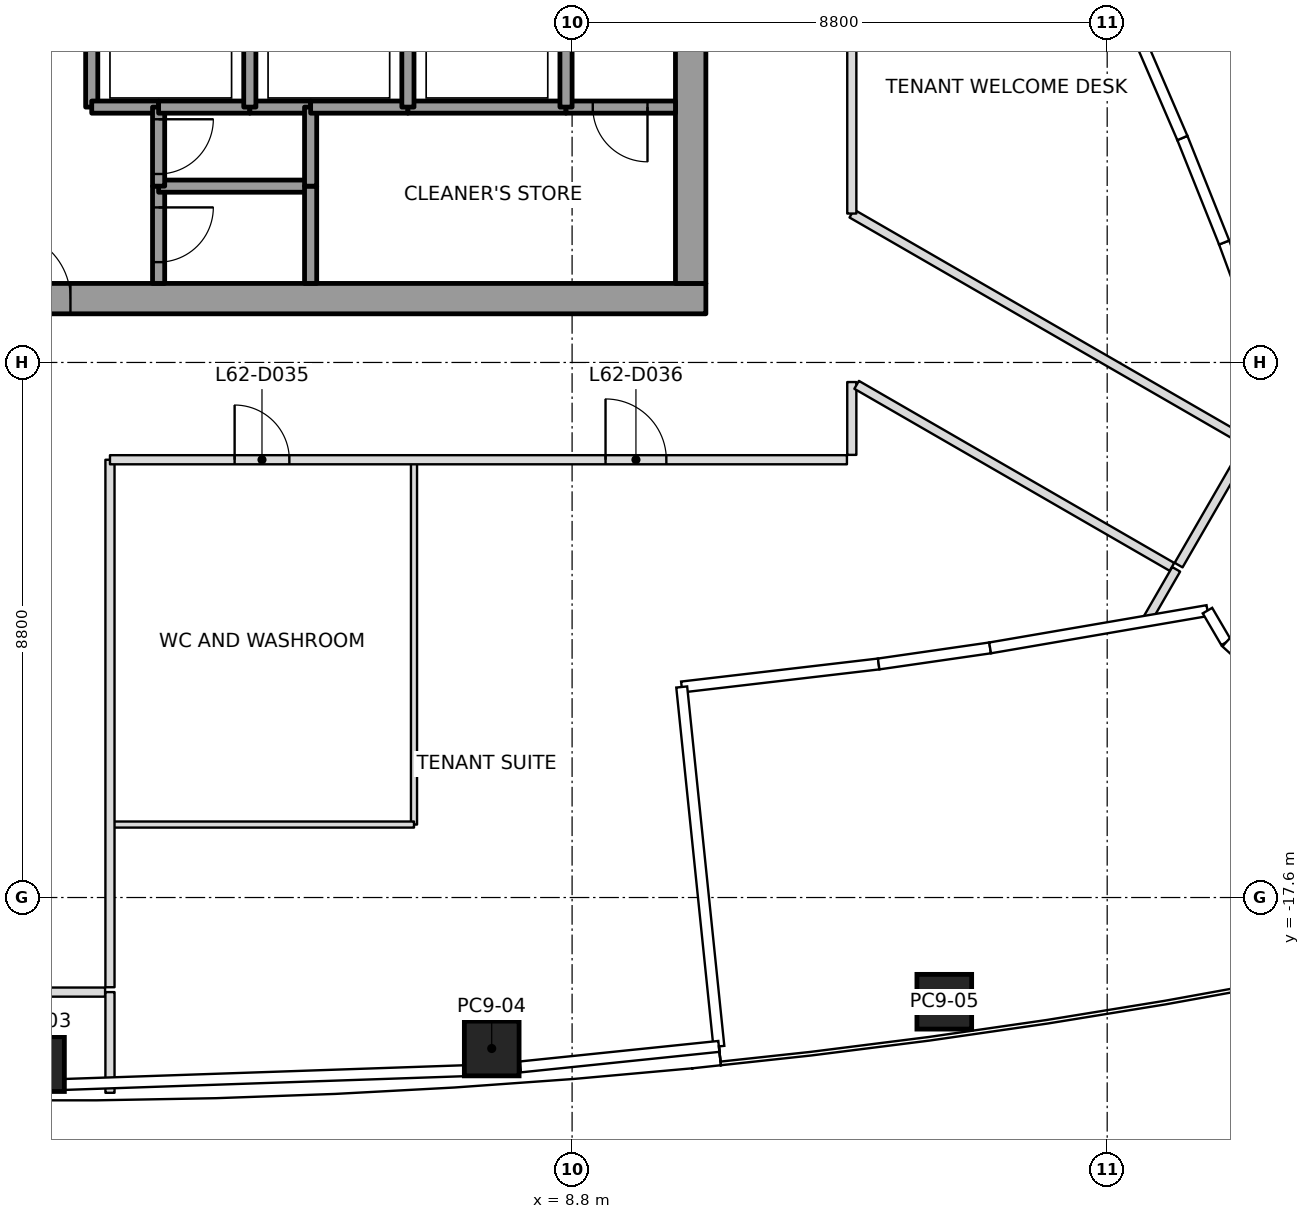
"""IFC4 building model, lengths in metres.
Left out: names, types, materials, properties, quantities, classifications, styles, units other than length and angle.
Written with IfcOpenShell. Run it as: python <this file> out.ifc"""

import sys

from ifc_helpers import new_model, si_unit, direction, frame, frame_2d, origin, origin_2d, place, context, subcontext, project, spatial, rectangle, extrude, element, fill, save


model = new_model("IFC4")
c1 = context("Model", 3, precision=1e-05, world=origin(), true_north=direction((0.0, 1.0)))
c2 = subcontext(c1, "Body", "Model", "MODEL_VIEW")
j1 = project(units=[si_unit("LENGTHUNIT", "METRE"), si_unit("PLANEANGLEUNIT", "RADIAN")], contexts=[c1])
p1 = place(None, origin())
s1 = spatial("IfcSite", under=j1, at=p1, CompositionType="ELEMENT")
p2 = place(p1, origin())
s2 = spatial("IfcBuilding", under=s1, at=p2, CompositionType="ELEMENT")
p3 = place(p2, frame((0.0, 0.0, 275.0)))
s3 = spatial("IfcBuildingStorey", under=s2, at=p3, CompositionType="ELEMENT", Elevation=275.0)
p4 = place(p3, frame((0.0, -20.34, 0.0), z_axis=(0.0, 0.011473854038, 0.99993417317), x_axis=(1.0, 0.0, 0.0)))
e1 = element("IfcColumn", 1, at=p4, inside=s3, PredefinedType="COLUMN", context=c2, shape_type="SweptSolid", body=[
    extrude(rectangle(XDim=0.9, YDim=0.9, at=origin_2d()), origin(), (0.0, 0.0, 1.0), 4.0),
])
p5 = place(p3, frame((7.478, -20.083, 0.0), z_axis=(-0.008788174922, 0.01116830563, 0.999899013366), x_axis=(0.997605695254, 0.068693994382, 0.008000745797)))
e2 = element("IfcColumn", 2, at=p5, inside=s3, PredefinedType="COLUMN", context=c2, shape_type="SweptSolid", body=[
    extrude(rectangle(XDim=0.9, YDim=0.9, at=origin_2d()), origin(), (0.0, 0.0, 1.0), 4.0),
])
p6 = place(p3, frame((14.921, -19.314, 0.0), z_axis=(-0.017452456582, 0.010373837829, 0.999793876381), x_axis=(0.990437350176, 0.137047764471, 0.015867124157)))
e3 = element("IfcColumn", 3, at=p6, inside=s3, PredefinedType="COLUMN", context=c2, shape_type="SweptSolid", body=[
    extrude(rectangle(XDim=0.9, YDim=0.9, at=origin_2d()), origin(), (0.0, 0.0, 1.0), 4.001),
])
p7 = place(p3, frame((-11.0, -7.75, 0.0), z_axis=(0.0, 0.0, 1.0), x_axis=(1.0, 0.0, 0.0)))
e4 = element("IfcWall", 4, at=p7, inside=s3, PredefinedType="SHEAR", context=c2, shape_type="SweptSolid", body=[
    extrude(rectangle(XDim=22.0, YDim=0.5, at=frame_2d((11.0, 0.0))), origin(), (0.0, 0.0, 1.0), 4.0),
])
p8 = place(p7, frame((10.45, 0.0, 0.0)))
e5 = element("IfcOpeningElement", 5, at=p8, cuts=e4, PredefinedType="OPENING", context=c2, shape_type="SweptSolid", body=[
    extrude(rectangle(XDim=1.1, YDim=2.1, at=frame_2d((0.55, 1.05))), frame((0.0, 0.25, 0.0), z_axis=(0.0, -1.0, 0.0), x_axis=(1.0, 0.0, 0.0)), (0.0, 0.0, 1.0), 0.5),
])
p9 = place(p3, frame((10.75, -7.5, 0.0), z_axis=(0.0, 0.0, 1.0), x_axis=(0.0, 1.0, 0.0)))
e6 = element("IfcWall", 6, at=p9, inside=s3, PredefinedType="SHEAR", context=c2, shape_type="SweptSolid", body=[
    extrude(rectangle(XDim=15.0, YDim=0.5, at=frame_2d((7.5, 0.0))), origin(), (0.0, 0.0, 1.0), 4.0),
])
p10 = place(p9, frame((6.6, 0.0, 0.0)))
e7 = element("IfcOpeningElement", 7, at=p10, cuts=e6, PredefinedType="OPENING", context=c2, shape_type="SweptSolid", body=[
    extrude(rectangle(XDim=1.8, YDim=2.1, at=frame_2d((0.9, 1.05))), frame((0.0, 0.25, 0.0), z_axis=(0.0, -1.0, 0.0), x_axis=(1.0, 0.0, 0.0)), (0.0, 0.0, 1.0), 0.5),
])
p11 = place(p3, frame((0.9, -1.8, 0.0), z_axis=(0.0, 0.0, 1.0), x_axis=(0.0, -1.0, 0.0)))
e8 = element("IfcWall", 8, at=p11, inside=s3, PredefinedType="SOLIDWALL", context=c2, shape_type="SweptSolid", body=[
    extrude(rectangle(XDim=2.8, YDim=0.2, at=frame_2d((1.4, 0.0))), origin(), (0.0, 0.0, 1.0), 3.85),
])
p12 = place(p3, frame((0.9, -4.6, 0.0), z_axis=(0.0, 0.0, 1.0), x_axis=(1.0, 0.0, 0.0)))
e9 = element("IfcWall", 9, at=p12, inside=s3, PredefinedType="SOLIDWALL", context=c2, shape_type="SweptSolid", body=[
    extrude(rectangle(XDim=1.1, YDim=0.2, at=frame_2d((0.55, 0.0))), origin(), (0.0, 0.0, 1.0), 3.85),
])
p13 = place(p3, frame((2.0, -5.9, 0.0), z_axis=(0.0, 0.0, 1.0), x_axis=(0.0, -1.0, 0.0)))
e10 = element("IfcWall", 10, at=p13, inside=s3, PredefinedType="SOLIDWALL", context=c2, shape_type="SweptSolid", body=[
    extrude(rectangle(XDim=1.6, YDim=0.2, at=frame_2d((0.8, 0.0))), origin(), (0.0, 0.0, 1.0), 3.85),
])
p14 = place(p13, frame((0.35, 0.0, 0.0)))
e11 = element("IfcOpeningElement", 11, at=p14, cuts=e10, PredefinedType="OPENING", context=c2, shape_type="SweptSolid", body=[
    extrude(rectangle(XDim=0.9, YDim=2.1, at=frame_2d((0.45, 1.05))), frame((0.0, 0.1, 0.0), z_axis=(0.0, -1.0, 0.0), x_axis=(1.0, 0.0, 0.0)), (0.0, 0.0, 1.0), 0.2),
])
p15 = place(p3, frame((4.5, -5.9, 0.0), z_axis=(0.0, 0.0, 1.0), x_axis=(-1.0, 0.0, 0.0)))
e12 = element("IfcWall", 12, at=p15, inside=s3, PredefinedType="SOLIDWALL", context=c2, shape_type="SweptSolid", body=[
    extrude(rectangle(XDim=2.5, YDim=0.2, at=frame_2d((1.25, 0.0))), origin(), (0.0, 0.0, 1.0), 3.85),
])
p16 = place(p3, frame((2.0, -4.6, 0.0), z_axis=(0.0, 0.0, 1.0), x_axis=(0.0, -1.0, 0.0)))
e13 = element("IfcWall", 13, at=p16, inside=s3, PredefinedType="SOLIDWALL", context=c2, shape_type="SweptSolid", body=[
    extrude(rectangle(XDim=1.3, YDim=0.2, at=frame_2d((0.65, 0.0))), origin(), (0.0, 0.0, 1.0), 3.85),
])
p17 = place(p16, frame((0.2, 0.0, 0.0)))
e14 = element("IfcOpeningElement", 14, at=p17, cuts=e13, PredefinedType="OPENING", context=c2, shape_type="SweptSolid", body=[
    extrude(rectangle(XDim=0.9, YDim=2.1, at=frame_2d((0.45, 1.05))), frame((0.0, 0.1, 0.0), z_axis=(0.0, -1.0, 0.0), x_axis=(1.0, 0.0, 0.0)), (0.0, 0.0, 1.0), 0.2),
])
p18 = place(p3, frame((3.5, -4.6, 0.0), z_axis=(0.0, 0.0, 1.0), x_axis=(-1.0, 0.0, 0.0)))
e15 = element("IfcWall", 15, at=p18, inside=s3, PredefinedType="SOLIDWALL", context=c2, shape_type="SweptSolid", body=[
    extrude(rectangle(XDim=1.5, YDim=0.2, at=frame_2d((0.75, 0.0))), origin(), (0.0, 0.0, 1.0), 3.85),
])
p19 = place(p3, frame((4.5, -4.6, 0.0), z_axis=(0.0, 0.0, 1.0), x_axis=(-1.0, 0.0, 0.0)))
e16 = element("IfcWall", 16, at=p19, inside=s3, PredefinedType="SOLIDWALL", context=c2, shape_type="SweptSolid", body=[
    extrude(rectangle(XDim=1.0, YDim=0.2, at=frame_2d((0.5, 0.0))), origin(), (0.0, 0.0, 1.0), 3.85),
])
p20 = place(p3, frame((3.5, -4.6, 0.0), z_axis=(0.0, 0.0, 1.0), x_axis=(0.0, 1.0, 0.0)))
e17 = element("IfcWall", 17, at=p20, inside=s3, PredefinedType="SOLIDWALL", context=c2, shape_type="SweptSolid", body=[
    extrude(rectangle(XDim=2.8, YDim=0.2, at=frame_2d((1.4, 0.0))), origin(), (0.0, 0.0, 1.0), 3.85),
])
p21 = place(p3, frame((4.5, -5.9, 0.0), z_axis=(0.0, 0.0, 1.0), x_axis=(0.0, -1.0, 0.0)))
e18 = element("IfcWall", 18, at=p21, inside=s3, PredefinedType="SOLIDWALL", context=c2, shape_type="SweptSolid", body=[
    extrude(rectangle(XDim=1.6, YDim=0.2, at=frame_2d((0.8, 0.0))), origin(), (0.0, 0.0, 1.0), 3.85),
])
p22 = place(p3, frame((4.5, -4.6, 0.0), z_axis=(0.0, 0.0, 1.0), x_axis=(0.0, -1.0, 0.0)))
e19 = element("IfcWall", 19, at=p22, inside=s3, PredefinedType="SOLIDWALL", context=c2, shape_type="SweptSolid", body=[
    extrude(rectangle(XDim=1.3, YDim=0.2, at=frame_2d((0.65, 0.0))), origin(), (0.0, 0.0, 1.0), 3.85),
])
p23 = place(p3, frame((6.1, -4.6, 0.0), z_axis=(0.0, 0.0, 1.0), x_axis=(-1.0, 0.0, 0.0)))
e20 = element("IfcWall", 20, at=p23, inside=s3, PredefinedType="SOLIDWALL", context=c2, shape_type="SweptSolid", body=[
    extrude(rectangle(XDim=1.6, YDim=0.2, at=frame_2d((0.8, 0.0))), origin(), (0.0, 0.0, 1.0), 3.85),
])
p24 = place(p3, frame((8.7, -4.6, 0.0), z_axis=(0.0, 0.0, 1.0), x_axis=(-1.0, 0.0, 0.0)))
e21 = element("IfcWall", 21, at=p24, inside=s3, PredefinedType="SOLIDWALL", context=c2, shape_type="SweptSolid", body=[
    extrude(rectangle(XDim=2.6, YDim=0.2, at=frame_2d((1.3, 0.0))), origin(), (0.0, 0.0, 1.0), 3.85),
])
p25 = place(p3, frame((6.1, -4.6, 0.0), z_axis=(0.0, 0.0, 1.0), x_axis=(0.0, 1.0, 0.0)))
e22 = element("IfcWall", 22, at=p25, inside=s3, PredefinedType="SOLIDWALL", context=c2, shape_type="SweptSolid", body=[
    extrude(rectangle(XDim=2.8, YDim=0.2, at=frame_2d((1.4, 0.0))), origin(), (0.0, 0.0, 1.0), 3.85),
])
p26 = place(p3, frame((10.5, -4.6, 0.0), z_axis=(0.0, 0.0, 1.0), x_axis=(-1.0, 0.0, 0.0)))
e23 = element("IfcWall", 23, at=p26, inside=s3, PredefinedType="SOLIDWALL", context=c2, shape_type="SweptSolid", body=[
    extrude(rectangle(XDim=1.8, YDim=0.2, at=frame_2d((0.9, 0.0))), origin(), (0.0, 0.0, 1.0), 3.85),
])
p27 = place(p26, frame((0.46, 0.0, 0.0)))
e24 = element("IfcOpeningElement", 24, at=p27, cuts=e23, PredefinedType="OPENING", context=c2, shape_type="SweptSolid", body=[
    extrude(rectangle(XDim=0.9, YDim=2.1, at=frame_2d((0.45, 1.05))), frame((0.0, 0.1, 0.0), z_axis=(0.0, -1.0, 0.0), x_axis=(1.0, 0.0, 0.0)), (0.0, 0.0, 1.0), 0.2),
])
p28 = place(p3, frame((8.7, -1.8, 0.0), z_axis=(0.0, 0.0, 1.0), x_axis=(0.0, -1.0, 0.0)))
e25 = element("IfcWall", 25, at=p28, inside=s3, PredefinedType="SOLIDWALL", context=c2, shape_type="SweptSolid", body=[
    extrude(rectangle(XDim=2.8, YDim=0.2, at=frame_2d((1.4, 0.0))), origin(), (0.0, 0.0, 1.0), 3.85),
])
p29 = place(p3, frame((1.2, -19.156, 0.0), z_axis=(0.0, 0.0, 1.0), x_axis=(0.0, -1.0, 0.0)))
e26 = element("IfcWall", 26, at=p29, inside=s3, PredefinedType="PARTITIONING", context=c2, shape_type="SweptSolid", body=[
    extrude(rectangle(XDim=1.656, YDim=0.15, at=frame_2d((0.828, 0.0))), origin(), (0.0, 0.0, 1.0), 3.234),
])
p30 = place(p3, frame((18.735, -12.202, 0.0), z_axis=(0.0, 0.0, 1.0), x_axis=(-0.500069196213, -0.865985449646, 0.0)))
e27 = element("IfcWall", 27, at=p30, inside=s3, PredefinedType="PARTITIONING", context=c2, shape_type="SweptSolid", body=[
    extrude(rectangle(XDim=0.995, YDim=0.15, at=frame_2d((0.498, 0.0))), origin(), (0.0, 0.0, 1.0), 3.45),
])
p31 = place(p3, frame((-1.12, -19.156, 0.0), z_axis=(0.0, 0.0, 1.0), x_axis=(1.0, 0.0, 0.0)))
e28 = element("IfcWall", 28, at=p31, inside=s3, PredefinedType="PARTITIONING", context=c2, shape_type="SweptSolid", body=[
    extrude(rectangle(XDim=2.24, YDim=0.15, at=frame_2d((1.12, 0.0))), origin(), (0.0, 0.0, 1.0), 3.45),
])
p32 = place(p3, frame((1.2, -19.076, 0.0), z_axis=(0.0, 0.0, 1.0), x_axis=(0.0, 1.0, 0.0)))
e29 = element("IfcWall", 29, at=p32, inside=s3, PredefinedType="PARTITIONING", context=c2, shape_type="SweptSolid", body=[
    extrude(rectangle(XDim=8.676, YDim=0.15, at=frame_2d((4.338, 0.0))), origin(), (0.0, 0.0, 1.0), 3.45),
])
p33 = place(p3, frame((1.2, -10.4, 0.0), z_axis=(0.0, 0.0, 1.0), x_axis=(1.0, 0.0, 0.0)))
e30 = element("IfcWall", 30, at=p33, inside=s3, PredefinedType="PARTITIONING", context=c2, shape_type="SweptSolid", body=[
    extrude(rectangle(XDim=12.12, YDim=0.15, at=frame_2d((6.06, 0.0))), origin(), (0.0, 0.0, 1.0), 3.317),
])
p34 = place(p33, frame((2.05, 0.0, 0.0)))
e31 = element("IfcOpeningElement", 31, at=p34, cuts=e30, PredefinedType="OPENING", context=c2, shape_type="SweptSolid", body=[
    extrude(rectangle(XDim=0.9, YDim=2.1, at=frame_2d((0.45, 1.05))), frame((0.0, 0.075, 0.0), z_axis=(0.0, -1.0, 0.0), x_axis=(1.0, 0.0, 0.0)), (0.0, 0.0, 1.0), 0.15),
])
p35 = place(p33, frame((8.15, 0.0, 0.0)))
e32 = element("IfcOpeningElement", 32, at=p35, cuts=e30, PredefinedType="OPENING", context=c2, shape_type="SweptSolid", body=[
    extrude(rectangle(XDim=1.0, YDim=2.1, at=frame_2d((0.5, 1.05))), frame((0.0, 0.075, 0.0), z_axis=(0.0, -1.0, 0.0), x_axis=(1.0, 0.0, 0.0)), (0.0, 0.0, 1.0), 0.15),
])
p36 = place(p3, frame((13.4, -10.32, 0.0), z_axis=(0.0, 0.0, 1.0), x_axis=(0.0, 1.0, 0.0)))
e33 = element("IfcWall", 33, at=p36, inside=s3, PredefinedType="PARTITIONING", context=c2, shape_type="SweptSolid", body=[
    extrude(rectangle(XDim=1.198, YDim=0.15, at=frame_2d((0.599, 0.0))), origin(), (0.0, 0.0, 1.0), 3.233),
])
p37 = place(p3, frame((13.479, -9.168, 0.0), z_axis=(0.0, 0.0, 1.0), x_axis=(0.866026717539, -0.499997724503, 0.0)))
e34 = element("IfcWall", 34, at=p37, inside=s3, PredefinedType="PARTITIONING", context=c2, shape_type="SweptSolid", body=[
    extrude(rectangle(XDim=5.988, YDim=0.15, at=frame_2d((2.994, 0.0))), origin(), (0.0, 0.0, 1.0), 3.233),
])
p38 = place(p3, frame((19.865, -10.083, 0.0), z_axis=(0.0, 0.0, 1.0), x_axis=(-0.86603092396, 0.499990438654, 0.0)))
e35 = element("IfcWall", 35, at=p38, inside=s3, PredefinedType="PARTITIONING", context=c2, shape_type="SweptSolid", body=[
    extrude(rectangle(XDim=7.466, YDim=0.15, at=frame_2d((3.733, 0.0))), origin(), (0.0, 0.0, 1.0), 3.317),
])
p39 = place(p3, frame((13.4, -6.351, 0.0), z_axis=(0.0, 0.0, 1.0), x_axis=(0.0, 1.0, 0.0)))
e36 = element("IfcWall", 36, at=p39, inside=s3, PredefinedType="PARTITIONING", context=c2, shape_type="SweptSolid", body=[
    extrude(rectangle(XDim=12.496, YDim=0.15, at=frame_2d((6.248, 0.0))), origin(), (0.0, 0.0, 1.0), 3.317),
])
p40 = place(p39, frame((5.748, 0.0, 0.0)))
e37 = element("IfcOpeningElement", 37, at=p40, cuts=e36, PredefinedType="OPENING", context=c2, shape_type="SweptSolid", body=[
    extrude(rectangle(XDim=1.0, YDim=2.1, at=frame_2d((0.5, 1.05))), frame((0.0, 0.075, 0.0), z_axis=(0.0, -1.0, 0.0), x_axis=(1.0, 0.0, 0.0)), (0.0, 0.0, 1.0), 0.15),
])
p41 = place(p3, frame((18.775, -12.133, 0.0), z_axis=(0.0, 0.0, 1.0), x_axis=(0.49994888933, 0.866054910533, 0.0)))
e38 = element("IfcWall", 38, at=p41, inside=s3, PredefinedType="PARTITIONING", context=c2, shape_type="SweptSolid", body=[
    extrude(rectangle(XDim=2.24, YDim=0.15, at=frame_2d((1.12, 0.0))), origin(), (0.0, 0.0, 1.0), 3.233),
])
p42 = place(p3, frame((6.2, -10.43, 0.0), z_axis=(0.0, 0.0, 1.0), x_axis=(0.0, -1.0, 0.0)))
e39 = element("IfcWall", 39, at=p42, inside=s3, PredefinedType="PARTITIONING", context=c2, shape_type="SweptSolid", body=[
    extrude(rectangle(XDim=5.97, YDim=0.1, at=frame_2d((2.985, 0.0))), origin(), (0.0, 0.0, 1.0), 3.45),
])
p43 = place(p3, frame((6.2, -16.4, 0.0), z_axis=(0.0, 0.0, 1.0), x_axis=(-1.0, 0.0, 0.0)))
e40 = element("IfcWall", 40, at=p43, inside=s3, PredefinedType="PARTITIONING", context=c2, shape_type="SweptSolid", body=[
    extrude(rectangle(XDim=4.97, YDim=0.1, at=frame_2d((2.485, 0.0))), origin(), (0.0, 0.0, 1.0), 3.317),
])
p44 = place(p34, origin())
e41 = element("IfcDoor", 41, at=p44, inside=s3, OperationType="SINGLE_SWING_LEFT", PredefinedType="DOOR", context=c2, shape_type="SweptSolid", body=[
    extrude(rectangle(XDim=0.9, YDim=2.1, at=frame_2d((0.45, 1.05))), frame((0.0, 0.025, 0.0), z_axis=(0.0, -1.0, 0.0), x_axis=(1.0, 0.0, 0.0)), (0.0, 0.0, 1.0), 0.05),
])
fill(e31, e41)
p45 = place(p35, origin())
e42 = element("IfcDoor", 42, at=p45, inside=s3, OperationType="SINGLE_SWING_RIGHT", PredefinedType="DOOR", context=c2, shape_type="SweptSolid", body=[
    extrude(rectangle(XDim=1.0, YDim=2.1, at=frame_2d((0.5, 1.05))), frame((0.0, 0.025, 0.0), z_axis=(0.0, -1.0, 0.0), x_axis=(1.0, 0.0, 0.0)), (0.0, 0.0, 1.0), 0.05),
])
fill(e32, e42)
p46 = place(p27, origin())
e43 = element("IfcDoor", 43, at=p46, inside=s3, OperationType="SINGLE_SWING_LEFT", PredefinedType="DOOR", context=c2, shape_type="SweptSolid", body=[
    extrude(rectangle(XDim=0.9, YDim=2.1, at=frame_2d((0.45, 1.05))), frame((0.0, 0.025, 0.0), z_axis=(0.0, -1.0, 0.0), x_axis=(1.0, 0.0, 0.0)), (0.0, 0.0, 1.0), 0.05),
])
fill(e24, e43)
p47 = place(p14, origin())
e44 = element("IfcDoor", 44, at=p47, inside=s3, OperationType="SINGLE_SWING_RIGHT", PredefinedType="DOOR", context=c2, shape_type="SweptSolid", body=[
    extrude(rectangle(XDim=0.9, YDim=2.1, at=frame_2d((0.45, 1.05))), frame((0.0, 0.025, 0.0), z_axis=(0.0, -1.0, 0.0), x_axis=(1.0, 0.0, 0.0)), (0.0, 0.0, 1.0), 0.05),
])
fill(e11, e44)
p48 = place(p17, origin())
e45 = element("IfcDoor", 45, at=p48, inside=s3, OperationType="SINGLE_SWING_RIGHT", PredefinedType="DOOR", context=c2, shape_type="SweptSolid", body=[
    extrude(rectangle(XDim=0.9, YDim=2.1, at=frame_2d((0.45, 1.05))), frame((0.0, 0.025, 0.0), z_axis=(0.0, -1.0, 0.0), x_axis=(1.0, 0.0, 0.0)), (0.0, 0.0, 1.0), 0.05),
])
fill(e14, e45)
p49 = place(p8, origin())
e46 = element("IfcDoor", 46, at=p49, inside=s3, OperationType="SINGLE_SWING_RIGHT", PredefinedType="DOOR", context=c2, shape_type="SweptSolid", body=[
    extrude(rectangle(XDim=1.1, YDim=2.1, at=frame_2d((0.55, 1.05))), frame((0.0, 0.025, 0.0), z_axis=(0.0, -1.0, 0.0), x_axis=(1.0, 0.0, 0.0)), (0.0, 0.0, 1.0), 0.05),
])
fill(e5, e46)
save(model, sys.argv[1])
